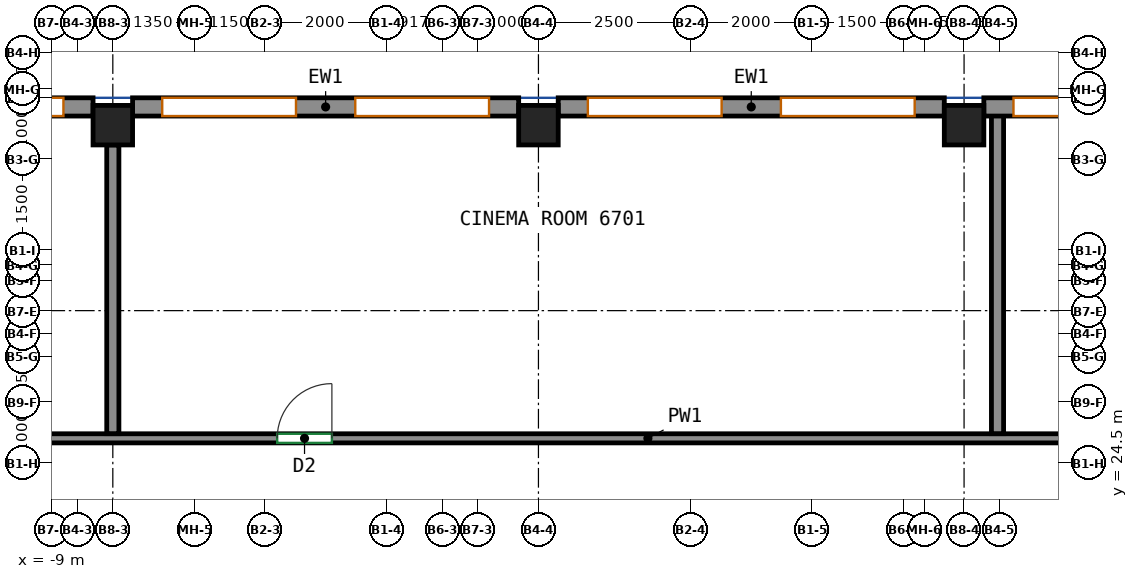
"""IFC4 building model, lengths in metres.
Left out: names, types, materials, properties, quantities, classifications, styles, units other than length and angle.
Written with IfcOpenShell. Run it as: python <this file> out.ifc"""

import sys

from ifc_helpers import new_model, si_unit, direction, frame, frame_2d, origin, origin_2d, place, context, subcontext, project, spatial, rectangle, extrude, source, transform, mapped, element, fill, save


model = new_model("IFC4")
c1 = context("Model", 3, precision=1e-05, world=origin(), true_north=direction((0.0, 1.0)))
c2 = subcontext(c1, "Body", "Model", "MODEL_VIEW")
j1 = project(units=[si_unit("LENGTHUNIT", "METRE"), si_unit("PLANEANGLEUNIT", "RADIAN")], contexts=[c1])
p1 = place(None, origin())
s1 = spatial("IfcSite", under=j1, at=p1, CompositionType="ELEMENT")
p2 = place(p1, origin())
s2 = spatial("IfcBuilding", under=s1, at=p2, CompositionType="ELEMENT")
p3 = place(p2, frame((0.0, 0.0, 273.8)))
s3 = spatial("IfcBuildingStorey", under=s2, at=p3, CompositionType="ELEMENT", Elevation=273.8)
m1 = source(origin(), c2, "Body", "SweptSolid", [
    extrude(rectangle(XDim=0.65, YDim=0.65, at=origin_2d()), origin(), (0.0, 0.0, 1.0), 3.12),
])
for number, where, z_axis, x_axis in (
    (1, (-8.0, 30.05, 0.0), (0.0, 0.0, 1.0), (1.0, 0.0, 0.0)),
    (2, (-1.0, 30.05, 0.0), (0.0, 0.0, 1.0), (1.0, 0.0, 0.0)),
    (3, (6.0, 30.05, 0.0), (0.0, 0.0, 1.0), (1.0, 0.0, 0.0)),
):
    element("IfcColumn", number, at=place(p3, frame(where, z_axis=z_axis, x_axis=x_axis)), inside=s3, PredefinedType="COLUMN", context=c2, shape_type="MappedRepresentation", body=[
        mapped(m1, transform((0.0, 0.0, 0.0))),
    ])
m2 = source(origin(), c2, "Body", "SweptSolid", [
    extrude(rectangle(XDim=6.35, YDim=0.3, at=frame_2d((3.175, 0.0))), origin(), (0.0, 0.0, 1.0), 3.12),
])
p4 = place(p3, frame((12.675, 30.35, 0.0), z_axis=(0.0, 0.0, 1.0), x_axis=(-1.0, 0.0, 0.0)))
e4 = element("IfcWall", 4, at=p4, inside=s3, PredefinedType="SOLIDWALL", context=c2, shape_type="MappedRepresentation", body=[
    mapped(m2, transform((0.0, 0.0, 0.0))),
])
p5 = place(p4, frame((0.488, 0.0, 0.8)))
e5 = element("IfcOpeningElement", 5, at=p5, cuts=e4, PredefinedType="OPENING", context=c2, shape_type="SweptSolid", body=[
    extrude(rectangle(XDim=2.2, YDim=2.05, at=frame_2d((1.1, 1.025))), frame((0.0, 0.16, 0.0), z_axis=(0.0, -1.0, 0.0), x_axis=(1.0, 0.0, 0.0)), (0.0, 0.0, 1.0), 0.32),
])
p6 = place(p4, frame((3.663, 0.0, 0.8)))
e6 = element("IfcOpeningElement", 6, at=p6, cuts=e4, PredefinedType="OPENING", context=c2, shape_type="SweptSolid", body=[
    extrude(rectangle(XDim=2.2, YDim=2.05, at=frame_2d((1.1, 1.025))), frame((0.0, 0.16, 0.0), z_axis=(0.0, -1.0, 0.0), x_axis=(1.0, 0.0, 0.0)), (0.0, 0.0, 1.0), 0.32),
])
p7 = place(p3, frame((5.675, 30.35, 0.0), z_axis=(0.0, 0.0, 1.0), x_axis=(-1.0, 0.0, 0.0)))
e7 = element("IfcWall", 7, at=p7, inside=s3, PredefinedType="SOLIDWALL", context=c2, shape_type="MappedRepresentation", body=[
    mapped(m2, transform((0.0, 0.0, 0.0))),
])
p8 = place(p7, frame((0.488, 0.0, 0.8)))
e8 = element("IfcOpeningElement", 8, at=p8, cuts=e7, PredefinedType="OPENING", context=c2, shape_type="SweptSolid", body=[
    extrude(rectangle(XDim=2.2, YDim=2.05, at=frame_2d((1.1, 1.025))), frame((0.0, 0.16, 0.0), z_axis=(0.0, -1.0, 0.0), x_axis=(1.0, 0.0, 0.0)), (0.0, 0.0, 1.0), 0.32),
])
p9 = place(p7, frame((3.663, 0.0, 0.8)))
e9 = element("IfcOpeningElement", 9, at=p9, cuts=e7, PredefinedType="OPENING", context=c2, shape_type="SweptSolid", body=[
    extrude(rectangle(XDim=2.2, YDim=2.05, at=frame_2d((1.1, 1.025))), frame((0.0, 0.16, 0.0), z_axis=(0.0, -1.0, 0.0), x_axis=(1.0, 0.0, 0.0)), (0.0, 0.0, 1.0), 0.32),
])
p10 = place(p3, frame((-1.325, 30.35, 0.0), z_axis=(0.0, 0.0, 1.0), x_axis=(-1.0, 0.0, 0.0)))
e10 = element("IfcWall", 10, at=p10, inside=s3, PredefinedType="SOLIDWALL", context=c2, shape_type="MappedRepresentation", body=[
    mapped(m2, transform((0.0, 0.0, 0.0))),
])
p11 = place(p10, frame((0.488, 0.0, 0.8)))
e11 = element("IfcOpeningElement", 11, at=p11, cuts=e10, PredefinedType="OPENING", context=c2, shape_type="SweptSolid", body=[
    extrude(rectangle(XDim=2.2, YDim=2.05, at=frame_2d((1.1, 1.025))), frame((0.0, 0.16, 0.0), z_axis=(0.0, -1.0, 0.0), x_axis=(1.0, 0.0, 0.0)), (0.0, 0.0, 1.0), 0.32),
])
p12 = place(p10, frame((3.663, 0.0, 0.8)))
e12 = element("IfcOpeningElement", 12, at=p12, cuts=e10, PredefinedType="OPENING", context=c2, shape_type="SweptSolid", body=[
    extrude(rectangle(XDim=2.2, YDim=2.05, at=frame_2d((1.1, 1.025))), frame((0.0, 0.16, 0.0), z_axis=(0.0, -1.0, 0.0), x_axis=(1.0, 0.0, 0.0)), (0.0, 0.0, 1.0), 0.32),
])
p13 = place(p3, frame((-8.325, 30.35, 0.0), z_axis=(0.0, 0.0, 1.0), x_axis=(-1.0, 0.0, 0.0)))
e13 = element("IfcWall", 13, at=p13, inside=s3, PredefinedType="SOLIDWALL", context=c2, shape_type="MappedRepresentation", body=[
    mapped(m2, transform((0.0, 0.0, 0.0))),
])
p14 = place(p13, frame((0.488, 0.0, 0.8)))
e14 = element("IfcOpeningElement", 14, at=p14, cuts=e13, PredefinedType="OPENING", context=c2, shape_type="SweptSolid", body=[
    extrude(rectangle(XDim=2.2, YDim=2.05, at=frame_2d((1.1, 1.025))), frame((0.0, 0.16, 0.0), z_axis=(0.0, -1.0, 0.0), x_axis=(1.0, 0.0, 0.0)), (0.0, 0.0, 1.0), 0.32),
])
p15 = place(p13, frame((3.663, 0.0, 0.8)))
e15 = element("IfcOpeningElement", 15, at=p15, cuts=e13, PredefinedType="OPENING", context=c2, shape_type="SweptSolid", body=[
    extrude(rectangle(XDim=2.2, YDim=2.05, at=frame_2d((1.1, 1.025))), frame((0.0, 0.16, 0.0), z_axis=(0.0, -1.0, 0.0), x_axis=(1.0, 0.0, 0.0)), (0.0, 0.0, 1.0), 0.32),
])
p16 = place(p3, frame((-19.075, 24.9, 0.0), z_axis=(0.0, 0.0, 1.0), x_axis=(1.0, 0.0, 0.0)))
e16 = element("IfcWall", 16, at=p16, inside=s3, PredefinedType="PARTITIONING", context=c2, shape_type="SweptSolid", body=[
    extrude(rectangle(XDim=39.75, YDim=0.15, at=frame_2d((19.875, 0.0))), origin(), (0.0, 0.0, 1.0), 3.12),
])
p17 = place(p16, frame((8.674, 0.0, 0.0)))
e17 = element("IfcOpeningElement", 17, at=p17, cuts=e16, PredefinedType="OPENING", context=c2, shape_type="SweptSolid", body=[
    extrude(rectangle(XDim=0.9, YDim=2.1, at=frame_2d((0.45, 1.05))), frame((0.0, 0.085, 0.0), z_axis=(0.0, -1.0, 0.0), x_axis=(1.0, 0.0, 0.0)), (0.0, 0.0, 1.0), 0.17),
])
p18 = place(p16, frame((13.778, 0.0, 0.0)))
e18 = element("IfcOpeningElement", 18, at=p18, cuts=e16, PredefinedType="OPENING", context=c2, shape_type="SweptSolid", body=[
    extrude(rectangle(XDim=0.9, YDim=2.1, at=frame_2d((0.45, 1.05))), frame((0.0, 0.085, 0.0), z_axis=(0.0, -1.0, 0.0), x_axis=(1.0, 0.0, 0.0)), (0.0, 0.0, 1.0), 0.17),
])
p19 = place(p3, frame((6.55, 24.977, 0.0), z_axis=(0.0, 0.0, 1.0), x_axis=(0.0, 1.0, 0.0)))
e19 = element("IfcWall", 19, at=p19, inside=s3, PredefinedType="PARTITIONING", context=c2, shape_type="SweptSolid", body=[
    extrude(rectangle(XDim=5.273, YDim=0.2, at=frame_2d((2.636, 0.0))), origin(), (0.0, 0.0, 1.0), 3.12),
])
p20 = place(p3, frame((-8.0, 29.725, 0.0), z_axis=(0.0, 0.0, 1.0), x_axis=(0.0, -1.0, 0.0)))
e20 = element("IfcWall", 20, at=p20, inside=s3, PredefinedType="PARTITIONING", context=c2, shape_type="SweptSolid", body=[
    extrude(rectangle(XDim=4.748, YDim=0.2, at=frame_2d((2.374, 0.0))), origin(), (0.0, 0.0, 1.0), 3.12),
])
p21 = place(p6, origin())
e21 = element("IfcWindow", 21, at=p21, inside=s3, PartitioningType="SINGLE_PANEL", PredefinedType="WINDOW", context=c2, shape_type="SweptSolid", body=[
    extrude(rectangle(XDim=2.2, YDim=2.05, at=frame_2d((1.1, 1.025))), frame((0.0, 0.03, 0.0), z_axis=(0.0, -1.0, 0.0), x_axis=(1.0, 0.0, 0.0)), (0.0, 0.0, 1.0), 0.06),
])
fill(e6, e21)
p22 = place(p8, origin())
e22 = element("IfcWindow", 22, at=p22, inside=s3, PartitioningType="SINGLE_PANEL", PredefinedType="WINDOW", context=c2, shape_type="SweptSolid", body=[
    extrude(rectangle(XDim=2.2, YDim=2.05, at=frame_2d((1.1, 1.025))), frame((0.0, 0.03, 0.0), z_axis=(0.0, -1.0, 0.0), x_axis=(1.0, 0.0, 0.0)), (0.0, 0.0, 1.0), 0.06),
])
fill(e8, e22)
p23 = place(p9, origin())
e23 = element("IfcWindow", 23, at=p23, inside=s3, PartitioningType="SINGLE_PANEL", PredefinedType="WINDOW", context=c2, shape_type="SweptSolid", body=[
    extrude(rectangle(XDim=2.2, YDim=2.05, at=frame_2d((1.1, 1.025))), frame((0.0, 0.03, 0.0), z_axis=(0.0, -1.0, 0.0), x_axis=(1.0, 0.0, 0.0)), (0.0, 0.0, 1.0), 0.06),
])
fill(e9, e23)
p24 = place(p11, origin())
e24 = element("IfcWindow", 24, at=p24, inside=s3, PartitioningType="SINGLE_PANEL", PredefinedType="WINDOW", context=c2, shape_type="SweptSolid", body=[
    extrude(rectangle(XDim=2.2, YDim=2.05, at=frame_2d((1.1, 1.025))), frame((0.0, 0.03, 0.0), z_axis=(0.0, -1.0, 0.0), x_axis=(1.0, 0.0, 0.0)), (0.0, 0.0, 1.0), 0.06),
])
fill(e11, e24)
p25 = place(p12, origin())
e25 = element("IfcWindow", 25, at=p25, inside=s3, PartitioningType="SINGLE_PANEL", PredefinedType="WINDOW", context=c2, shape_type="SweptSolid", body=[
    extrude(rectangle(XDim=2.2, YDim=2.05, at=frame_2d((1.1, 1.025))), frame((0.0, 0.03, 0.0), z_axis=(0.0, -1.0, 0.0), x_axis=(1.0, 0.0, 0.0)), (0.0, 0.0, 1.0), 0.06),
])
fill(e12, e25)
p26 = place(p14, origin())
e26 = element("IfcWindow", 26, at=p26, inside=s3, PartitioningType="SINGLE_PANEL", PredefinedType="WINDOW", context=c2, shape_type="SweptSolid", body=[
    extrude(rectangle(XDim=2.2, YDim=2.05, at=frame_2d((1.1, 1.025))), frame((0.0, 0.03, 0.0), z_axis=(0.0, -1.0, 0.0), x_axis=(1.0, 0.0, 0.0)), (0.0, 0.0, 1.0), 0.06),
])
fill(e14, e26)
p27 = place(p18, origin())
e27 = element("IfcDoor", 27, at=p27, inside=s3, OperationType="SINGLE_SWING_RIGHT", PredefinedType="DOOR", context=c2, shape_type="SweptSolid", body=[
    extrude(rectangle(XDim=0.9, YDim=2.1, at=frame_2d((0.45, 1.05))), frame((0.0, 0.025, 0.0), z_axis=(0.0, -1.0, 0.0), x_axis=(1.0, 0.0, 0.0)), (0.0, 0.0, 1.0), 0.05),
])
fill(e18, e27)
save(model, sys.argv[1])
